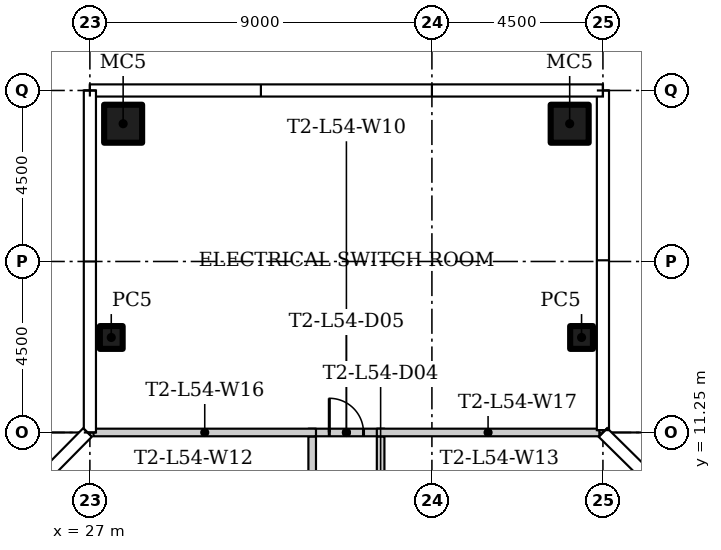
"""IFC4 building model, lengths in metres.
Left out: names, types, materials, properties, quantities, classifications, styles, units other than length and angle.
Written with IfcOpenShell. Run it as: python <this file> out.ifc"""

import sys

from ifc_helpers import new_model, si_unit, direction, frame, frame_2d, origin, origin_2d, place, context, subcontext, project, spatial, rectangle, hollow_rectangle, extrude, element, fill, save


model = new_model("IFC4")
c1 = context("Model", 3, precision=1e-05, world=origin(), true_north=direction((0.0, 1.0)))
c2 = subcontext(c1, "Body", "Model", "MODEL_VIEW")
j1 = project(units=[si_unit("LENGTHUNIT", "METRE"), si_unit("PLANEANGLEUNIT", "RADIAN")], contexts=[c1])
p1 = place(None, origin())
s1 = spatial("IfcSite", under=j1, at=p1, CompositionType="ELEMENT")
p2 = place(p1, origin())
s2 = spatial("IfcBuilding", under=s1, at=p2, CompositionType="ELEMENT")
p3 = place(p2, frame((0.0, 0.0, 225.6)))
s3 = spatial("IfcBuildingStorey", under=s2, at=p3, CompositionType="ELEMENT", Elevation=225.6)
p4 = place(p3, frame((39.938, 13.75, 0.0)))
e1 = element("IfcColumn", 1, at=p4, inside=s3, PredefinedType="COLUMN", context=c2, shape_type="SweptSolid", body=[
    extrude(hollow_rectangle(XDim=0.6, YDim=0.6, WallThickness=0.02, at=origin_2d()), origin(), (0.0, 0.0, 1.0), 4.45),
])
p5 = place(p3, frame((39.625, 19.375, 0.0)))
e2 = element("IfcColumn", 2, at=p5, inside=s3, PredefinedType="COLUMN", context=c2, shape_type="SweptSolid", body=[
    extrude(hollow_rectangle(XDim=1.0, YDim=1.0, WallThickness=0.04, at=origin_2d()), origin(), (0.0, 0.0, 1.0), 4.45),
])
p6 = place(p3, frame((27.562, 13.75, 0.0)))
e3 = element("IfcColumn", 3, at=p6, inside=s3, PredefinedType="COLUMN", context=c2, shape_type="SweptSolid", body=[
    extrude(hollow_rectangle(XDim=0.6, YDim=0.6, WallThickness=0.02, at=origin_2d()), origin(), (0.0, 0.0, 1.0), 4.45),
])
p7 = place(p3, frame((27.875, 19.375, 0.0)))
e4 = element("IfcColumn", 4, at=p7, inside=s3, PredefinedType="COLUMN", context=c2, shape_type="SweptSolid", body=[
    extrude(hollow_rectangle(XDim=1.0, YDim=1.0, WallThickness=0.04, at=origin_2d()), origin(), (0.0, 0.0, 1.0), 4.45),
])
p8 = place(p3, frame((32.85, 2.55, 0.0), z_axis=(0.0, 0.0, 1.0), x_axis=(0.0, 1.0, 0.0)))
e5 = element("IfcWall", 5, at=p8, inside=s3, PredefinedType="PARTITIONING", context=c2, shape_type="SweptSolid", body=[
    extrude(rectangle(XDim=8.6, YDim=0.2, at=frame_2d((4.3, 0.0))), origin(), (0.0, 0.0, 1.0), 4.45),
])
p9 = place(p8, frame((5.7, 0.0, 0.0)))
e6 = element("IfcOpeningElement", 6, at=p9, cuts=e5, PredefinedType="OPENING", context=c2, shape_type="SweptSolid", body=[
    extrude(rectangle(XDim=1.5, YDim=2.4, at=frame_2d((0.75, 1.2))), frame((0.0, 0.11, 0.0), z_axis=(0.0, -1.0, 0.0), x_axis=(1.0, 0.0, 0.0)), (0.0, 0.0, 1.0), 0.22),
])
p10 = place(p3, frame((34.65, 11.15, 0.0), z_axis=(0.0, 0.0, 1.0), x_axis=(0.0, -1.0, 0.0)))
e7 = element("IfcWall", 7, at=p10, inside=s3, PredefinedType="PARTITIONING", context=c2, shape_type="SweptSolid", body=[
    extrude(rectangle(XDim=8.6, YDim=0.2, at=frame_2d((4.3, 0.0))), origin(), (0.0, 0.0, 1.0), 4.45),
])
p11 = place(p10, frame((1.4, 0.0, 0.0)))
e8 = element("IfcOpeningElement", 8, at=p11, cuts=e7, PredefinedType="OPENING", context=c2, shape_type="SweptSolid", body=[
    extrude(rectangle(XDim=1.5, YDim=2.4, at=frame_2d((0.75, 1.2))), frame((0.0, 0.11, 0.0), z_axis=(0.0, -1.0, 0.0), x_axis=(1.0, 0.0, 0.0)), (0.0, 0.0, 1.0), 0.22),
])
p12 = place(p3, frame((32.75, 11.25, 0.0)))
e9 = element("IfcWall", 9, at=p12, inside=s3, PredefinedType="PARTITIONING", context=c2, shape_type="SweptSolid", body=[
    extrude(rectangle(XDim=2.001, YDim=0.2, at=frame_2d((1.0, 0.0))), origin(), (0.0, 0.0, 1.0), 4.45),
])
p13 = place(p12, frame((0.55, 0.0, 0.0)))
e10 = element("IfcOpeningElement", 10, at=p13, cuts=e9, PredefinedType="OPENING", context=c2, shape_type="SweptSolid", body=[
    extrude(rectangle(XDim=0.9, YDim=2.4, at=frame_2d((0.45, 1.2))), frame((0.0, 0.11, 0.0), z_axis=(0.0, -1.0, 0.0), x_axis=(1.0, 0.0, 0.0)), (0.0, 0.0, 1.0), 0.22),
])
for number, where, z_axis, x_axis in (
    (11, (32.95, 11.25, 0.0), (0.0, 0.0, 1.0), (-1.0, 0.0, 0.0)),
    (12, (40.405, 11.25, 0.0), (0.0, 0.0, 1.0), (-1.0, 0.0, 0.0)),
):
    element("IfcWall", number, at=place(p3, frame(where, z_axis=z_axis, x_axis=x_axis)), inside=s3, PredefinedType="PARTITIONING", context=c2, shape_type="SweptSolid", body=[
        extrude(rectangle(XDim=5.855, YDim=0.2, at=frame_2d((2.927, 0.0))), origin(), (0.0, 0.0, 1.0), 4.45),
    ])
p14 = place(p13, origin())
e13 = element("IfcDoor", 13, at=p14, inside=s3, OperationType="SINGLE_SWING_LEFT", PredefinedType="DOOR", context=c2, shape_type="SweptSolid", body=[
    extrude(rectangle(XDim=0.9, YDim=2.4, at=frame_2d((0.45, 1.2))), frame((0.0, 0.025, 0.0), z_axis=(0.0, -1.0, 0.0), x_axis=(1.0, 0.0, 0.0)), (0.0, 0.0, 1.0), 0.05),
])
fill(e10, e13)
save(model, sys.argv[1])
